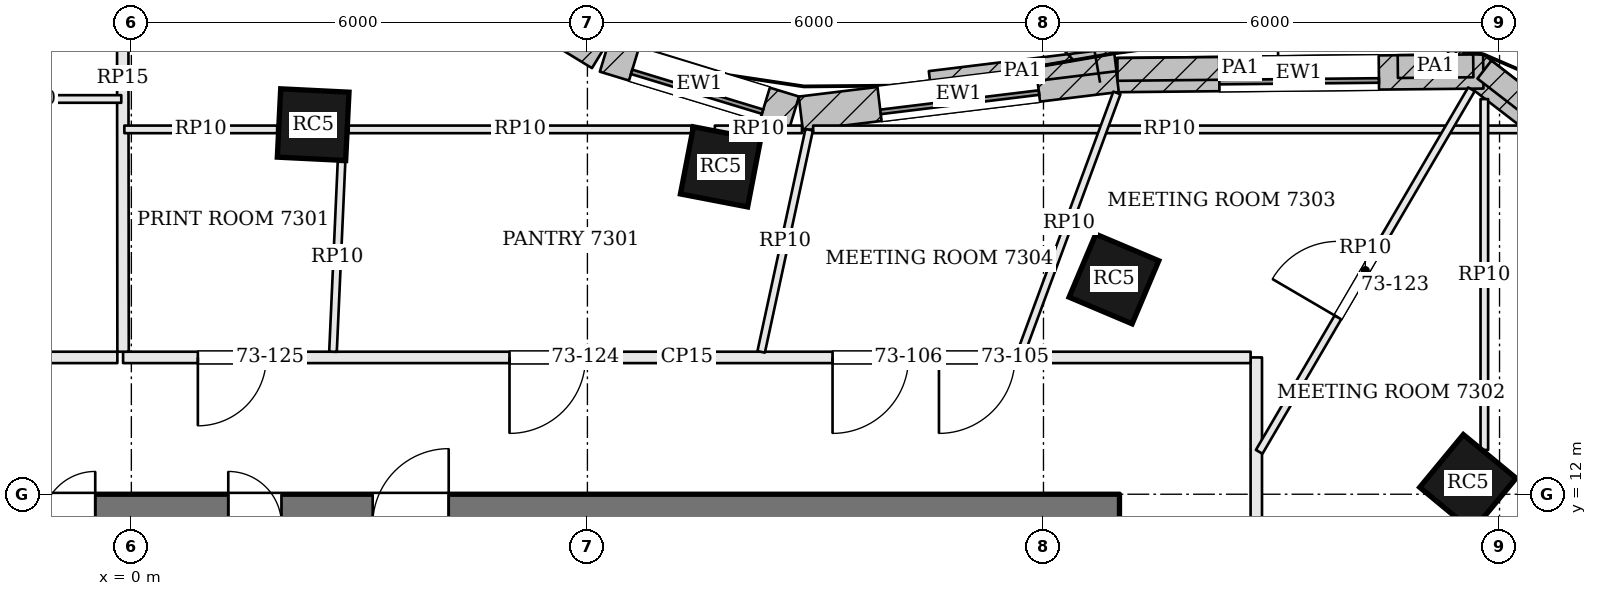
"""IFC4 building model, lengths in metres.
Left out: names, types, materials, properties, quantities, classifications, styles, units other than length and angle.
Written with IfcOpenShell. Run it as: python <this file> out.ifc"""

import sys

from ifc_helpers import new_model, si_unit, direction, frame, frame_2d, origin, origin_2d, place, context, subcontext, project, spatial, rectangle, extrude, element, fill, save


model = new_model("IFC4")
c1 = context("Model", 3, precision=1e-05, world=origin(), true_north=direction((0.0, 1.0)))
c2 = subcontext(c1, "Body", "Model", "MODEL_VIEW")
j1 = project(units=[si_unit("LENGTHUNIT", "METRE"), si_unit("PLANEANGLEUNIT", "RADIAN")], contexts=[c1])
p1 = place(None, origin())
s1 = spatial("IfcSite", under=j1, at=p1, CompositionType="ELEMENT")
p2 = place(p1, origin())
s2 = spatial("IfcBuilding", under=s1, at=p2, CompositionType="ELEMENT")
p3 = place(p2, frame((0.0, 0.0, 296.1)))
s3 = spatial("IfcBuildingStorey", under=s2, at=p3, CompositionType="ELEMENT", Elevation=296.1)
p4 = place(p3, frame((-13.0, 11.6, 0.0), z_axis=(0.0, 0.0, 1.0), x_axis=(1.0, 0.0, 0.0)))
e1 = element("IfcWall", 1, at=p4, inside=s3, PredefinedType="SHEAR", context=c2, shape_type="SweptSolid", body=[
    extrude(rectangle(XDim=26.0, YDim=0.8, at=frame_2d((13.0, 0.0))), origin(), (0.0, 0.0, 1.0), 3.9),
])
p5 = place(p4, frame((8.825, 0.0, 0.0)))
e2 = element("IfcOpeningElement", 2, at=p5, cuts=e1, PredefinedType="OPENING", context=c2, shape_type="SweptSolid", body=[
    extrude(rectangle(XDim=1.0, YDim=2.1, at=frame_2d((0.5, 1.05))), frame((0.0, 0.41, 0.0), z_axis=(0.0, -1.0, 0.0), x_axis=(1.0, 0.0, 0.0)), (0.0, 0.0, 1.0), 0.82),
])
p6 = place(p4, frame((11.825, 0.0, 0.0)))
e3 = element("IfcOpeningElement", 3, at=p6, cuts=e1, PredefinedType="OPENING", context=c2, shape_type="SweptSolid", body=[
    extrude(rectangle(XDim=0.7, YDim=2.1, at=frame_2d((0.35, 1.05))), frame((0.0, 0.41, 0.0), z_axis=(0.0, -1.0, 0.0), x_axis=(1.0, 0.0, 0.0)), (0.0, 0.0, 1.0), 0.82),
])
p7 = place(p4, frame((14.275, 0.0, 0.0)))
e4 = element("IfcOpeningElement", 4, at=p7, cuts=e1, PredefinedType="OPENING", context=c2, shape_type="SweptSolid", body=[
    extrude(rectangle(XDim=0.7, YDim=2.1, at=frame_2d((0.35, 1.05))), frame((0.0, 0.41, 0.0), z_axis=(0.0, -1.0, 0.0), x_axis=(1.0, 0.0, 0.0)), (0.0, 0.0, 1.0), 0.82),
])
p8 = place(p4, frame((16.175, 0.0, 0.0)))
e5 = element("IfcOpeningElement", 5, at=p8, cuts=e1, PredefinedType="OPENING", context=c2, shape_type="SweptSolid", body=[
    extrude(rectangle(XDim=1.0, YDim=2.1, at=frame_2d((0.5, 1.05))), frame((0.0, 0.41, 0.0), z_axis=(0.0, -1.0, 0.0), x_axis=(1.0, 0.0, 0.0)), (0.0, 0.0, 1.0), 0.82),
])
for number, where, z_axis, x_axis in (
    (6, (17.584, 12.151, 0.0), (0.0, 0.0, 1.0), (-0.771, 0.637, 0.0)),
    (7, (12.927, 14.832, 0.0), (0.0, 0.0, 1.0), (-0.921, 0.389, 0.0)),
    (8, (7.751, 16.307, 0.0), (0.0, 0.0, 1.0), (-0.982, 0.189, 0.0)),
    (9, (2.392, 16.862, 0.0), (0.0, 0.0, 1.0), (-0.999, 0.049, 0.0)),
):
    element("IfcColumn", number, at=place(p3, frame(where, z_axis=z_axis, x_axis=x_axis)), inside=s3, PredefinedType="COLUMN", context=c2, shape_type="SweptSolid", body=[
        extrude(rectangle(XDim=0.9, YDim=0.9, at=origin_2d()), origin(), (0.0, 0.0, 1.0), 3.9),
    ])
p9 = place(p3, frame((20.896, 15.104, 0.0), z_axis=(0.0, 0.0, 1.0), x_axis=(-0.791693388686, 0.610918634771, 0.0)))
e10 = element("IfcWall", 10, at=p9, inside=s3, PredefinedType="SOLIDWALL", context=c2, shape_type="SweptSolid", body=[
    extrude(rectangle(XDim=4.1, YDim=0.45, at=frame_2d((2.05, 0.0))), origin(), (0.0, 0.0, 1.0), 3.7),
])
p10 = place(p9, frame((1.0, 0.0, 0.9)))
e11 = element("IfcOpeningElement", 11, at=p10, cuts=e10, PredefinedType="OPENING", context=c2, shape_type="SweptSolid", body=[
    extrude(rectangle(XDim=2.1, YDim=2.3, at=frame_2d((1.05, 1.15))), frame((0.0, 0.235, 0.0), z_axis=(0.0, -1.0, 0.0), x_axis=(1.0, 0.0, 0.0)), (0.0, 0.0, 1.0), 0.47),
])
p11 = place(p3, frame((17.786, 17.562, 0.0), z_axis=(0.0, 0.0, 1.0), x_axis=(-0.999950280333, -0.00997180335, 0.0)))
e12 = element("IfcWall", 12, at=p11, inside=s3, PredefinedType="SOLIDWALL", context=c2, shape_type="SweptSolid", body=[
    extrude(rectangle(XDim=4.848, YDim=0.45, at=frame_2d((2.424, 0.0))), origin(), (0.0, 0.0, 1.0), 3.7),
])
p12 = place(p11, frame((1.374, 0.0, 0.9)))
e13 = element("IfcOpeningElement", 13, at=p12, cuts=e12, PredefinedType="OPENING", context=c2, shape_type="SweptSolid", body=[
    extrude(rectangle(XDim=2.1, YDim=2.3, at=frame_2d((1.05, 1.15))), frame((0.0, 0.235, 0.0), z_axis=(0.0, -1.0, 0.0), x_axis=(1.0, 0.0, 0.0)), (0.0, 0.0, 1.0), 0.47),
])
p13 = place(p3, frame((12.963, 17.515, 0.0), z_axis=(0.0, 0.0, 1.0), x_axis=(-0.992644852039, -0.121062784211, 0.0)))
e14 = element("IfcWall", 14, at=p13, inside=s3, PredefinedType="SOLIDWALL", context=c2, shape_type="SweptSolid", body=[
    extrude(rectangle(XDim=4.187, YDim=0.45, at=frame_2d((2.093, 0.0))), origin(), (0.0, 0.0, 1.0), 3.7),
])
p14 = place(p13, frame((1.043, 0.0, 0.9)))
e15 = element("IfcOpeningElement", 15, at=p14, cuts=e14, PredefinedType="OPENING", context=c2, shape_type="SweptSolid", body=[
    extrude(rectangle(XDim=2.1, YDim=2.3, at=frame_2d((1.05, 1.15))), frame((0.0, 0.235, 0.0), z_axis=(0.0, -1.0, 0.0), x_axis=(1.0, 0.0, 0.0)), (0.0, 0.0, 1.0), 0.47),
])
p15 = place(p3, frame((8.718, 17.017, 0.0), z_axis=(0.0, 0.0, 1.0), x_axis=(-0.956643192195, 0.291262429482, 0.0)))
e16 = element("IfcWall", 16, at=p15, inside=s3, PredefinedType="SOLIDWALL", context=c2, shape_type="SweptSolid", body=[
    extrude(rectangle(XDim=2.602, YDim=0.45, at=frame_2d((1.301, 0.0))), origin(), (0.0, 0.0, 1.0), 3.7),
])
p16 = place(p15, frame((0.401, 0.0, 0.9)))
e17 = element("IfcOpeningElement", 17, at=p16, cuts=e16, PredefinedType="OPENING", context=c2, shape_type="SweptSolid", body=[
    extrude(rectangle(XDim=1.8, YDim=2.3, at=frame_2d((0.9, 1.15))), frame((0.0, 0.235, 0.0), z_axis=(0.0, -1.0, 0.0), x_axis=(1.0, 0.0, 0.0)), (0.0, 0.0, 1.0), 0.47),
])
p17 = place(p3, frame((6.177, 17.798, 0.0), z_axis=(0.0, 0.0, 1.0), x_axis=(-0.852939764965, 0.52200934603, 0.0)))
e18 = element("IfcWall", 18, at=p17, inside=s3, PredefinedType="SOLIDWALL", context=c2, shape_type="SweptSolid", body=[
    extrude(rectangle(XDim=4.113, YDim=0.45, at=frame_2d((2.056, 0.0))), origin(), (0.0, 0.0, 1.0), 3.7),
])
p18 = place(p17, frame((1.006, 0.0, 0.9)))
e19 = element("IfcOpeningElement", 19, at=p18, cuts=e18, PredefinedType="OPENING", context=c2, shape_type="SweptSolid", body=[
    extrude(rectangle(XDim=2.1, YDim=2.3, at=frame_2d((1.05, 1.15))), frame((0.0, 0.235, 0.0), z_axis=(0.0, -1.0, 0.0), x_axis=(1.0, 0.0, 0.0)), (0.0, 0.0, 1.0), 0.47),
])
p19 = place(p3, frame((17.362, 17.538, 0.0), z_axis=(0.0, 0.0, 1.0), x_axis=(0.230469860183, 0.973079464148, 0.0)))
e20 = element("IfcWall", 20, at=p19, inside=s3, PredefinedType="SOLIDWALL", context=c2, shape_type="SweptSolid", body=[
    extrude(rectangle(XDim=1.75, YDim=0.2, at=frame_2d((0.875, 0.0))), origin(), (0.0, 0.0, 1.0), 3.7),
])
p20 = place(p3, frame((20.396, 15.584, 3.9), z_axis=(0.0, 0.0, 1.0), x_axis=(-0.791653544836, 0.610970265191, 0.0)))
e21 = element("IfcWall", 21, at=p20, inside=s3, PredefinedType="PARAPET", context=c2, shape_type="SweptSolid", body=[
    extrude(rectangle(XDim=3.277, YDim=0.3, at=frame_2d((1.638, 0.0))), origin(), (0.0, 0.0, 1.0), 1.1),
])
p21 = place(p3, frame((17.655, 17.636, 3.9), z_axis=(0.0, 0.0, 1.0), x_axis=(-0.999949189172, -0.010080628659, 0.0)))
e22 = element("IfcWall", 22, at=p21, inside=s3, PredefinedType="PARAPET", context=c2, shape_type="SweptSolid", body=[
    extrude(rectangle(XDim=0.993, YDim=0.3, at=frame_2d((0.497, 0.0))), origin(), (0.0, 0.0, 1.0), 1.1),
])
p22 = place(p3, frame((16.205, 17.621, 3.9), z_axis=(0.0, 0.0, 1.0), x_axis=(-0.999950267811, -0.009973058961, 0.0)))
e23 = element("IfcWall", 23, at=p22, inside=s3, PredefinedType="PARAPET", context=c2, shape_type="SweptSolid", body=[
    extrude(rectangle(XDim=3.231, YDim=0.3, at=frame_2d((1.616, 0.0))), origin(), (0.0, 0.0, 1.0), 1.1),
])
p23 = place(p3, frame((12.942, 17.714, 3.9), z_axis=(0.0, 0.0, 1.0), x_axis=(-0.992648796767, -0.121030435331, 0.0)))
e24 = element("IfcWall", 24, at=p23, inside=s3, PredefinedType="PARAPET", context=c2, shape_type="SweptSolid", body=[
    extrude(rectangle(XDim=2.451, YDim=0.3, at=frame_2d((1.226, 0.0))), origin(), (0.0, 0.0, 1.0), 1.1),
])
p24 = place(p3, frame((14.8, 0.048, 0.0), z_axis=(0.0, 0.0, 1.0), x_axis=(0.0, 1.0, 0.0)))
e25 = element("IfcWall", 25, at=p24, inside=s3, PredefinedType="PARTITIONING", context=c2, shape_type="SweptSolid", body=[
    extrude(rectangle(XDim=13.752, YDim=0.15, at=frame_2d((6.876, 0.0))), origin(), (0.0, 0.0, 1.0), 3.198),
])
p25 = place(p24, frame((1.912, 0.0, 0.0)))
e26 = element("IfcOpeningElement", 26, at=p25, cuts=e25, PredefinedType="OPENING", context=c2, shape_type="SweptSolid", body=[
    extrude(rectangle(XDim=1.8, YDim=2.1, at=frame_2d((0.9, 1.05))), frame((0.0, 0.085, 0.0), z_axis=(0.0, -1.0, 0.0), x_axis=(1.0, 0.0, 0.0)), (0.0, 0.0, 1.0), 0.17),
])
p26 = place(p24, frame((6.381, 0.0, 0.0)))
e27 = element("IfcOpeningElement", 27, at=p26, cuts=e25, PredefinedType="OPENING", context=c2, shape_type="SweptSolid", body=[
    extrude(rectangle(XDim=1.0, YDim=2.4, at=frame_2d((0.5, 1.2))), frame((0.0, 0.085, 0.0), z_axis=(0.0, -1.0, 0.0), x_axis=(1.0, 0.0, 0.0)), (0.0, 0.0, 1.0), 0.17),
])
p27 = place(p24, frame((9.792, 0.0, 0.0)))
e28 = element("IfcOpeningElement", 28, at=p27, cuts=e25, PredefinedType="OPENING", context=c2, shape_type="SweptSolid", body=[
    extrude(rectangle(XDim=1.0, YDim=2.4, at=frame_2d((0.5, 1.2))), frame((0.0, 0.085, 0.0), z_axis=(0.0, -1.0, 0.0), x_axis=(1.0, 0.0, 0.0)), (0.0, 0.0, 1.0), 0.17),
])
p28 = place(p3, frame((14.725, 13.8, 0.0), z_axis=(0.0, 0.0, 1.0), x_axis=(-1.0, 0.0, 0.0)))
e29 = element("IfcWall", 29, at=p28, inside=s3, PredefinedType="PARTITIONING", context=c2, shape_type="SweptSolid", body=[
    extrude(rectangle(XDim=14.834, YDim=0.15, at=frame_2d((7.417, 0.0))), origin(), (0.0, 0.0, 1.0), 3.198),
])
p29 = place(p28, frame((3.1, 0.0, 0.0)))
e30 = element("IfcOpeningElement", 30, at=p29, cuts=e29, PredefinedType="OPENING", context=c2, shape_type="SweptSolid", body=[
    extrude(rectangle(XDim=1.0, YDim=2.4, at=frame_2d((0.5, 1.2))), frame((0.0, 0.085, 0.0), z_axis=(0.0, -1.0, 0.0), x_axis=(1.0, 0.0, 0.0)), (0.0, 0.0, 1.0), 0.17),
])
p30 = place(p28, frame((4.5, 0.0, 0.0)))
e31 = element("IfcOpeningElement", 31, at=p30, cuts=e29, PredefinedType="OPENING", context=c2, shape_type="SweptSolid", body=[
    extrude(rectangle(XDim=1.0, YDim=2.4, at=frame_2d((0.5, 1.2))), frame((0.0, 0.085, 0.0), z_axis=(0.0, -1.0, 0.0), x_axis=(1.0, 0.0, 0.0)), (0.0, 0.0, 1.0), 0.17),
])
p31 = place(p28, frame((8.75, 0.0, 0.0)))
e32 = element("IfcOpeningElement", 32, at=p31, cuts=e29, PredefinedType="OPENING", context=c2, shape_type="SweptSolid", body=[
    extrude(rectangle(XDim=1.0, YDim=2.1, at=frame_2d((0.5, 1.05))), frame((0.0, 0.085, 0.0), z_axis=(0.0, -1.0, 0.0), x_axis=(1.0, 0.0, 0.0)), (0.0, 0.0, 1.0), 0.17),
])
p32 = place(p28, frame((12.95, 0.0, 0.0)))
e33 = element("IfcOpeningElement", 33, at=p32, cuts=e29, PredefinedType="OPENING", context=c2, shape_type="SweptSolid", body=[
    extrude(rectangle(XDim=0.9, YDim=2.1, at=frame_2d((0.45, 1.05))), frame((0.0, 0.085, 0.0), z_axis=(0.0, -1.0, 0.0), x_axis=(1.0, 0.0, 0.0)), (0.0, 0.0, 1.0), 0.17),
])
p33 = place(p3, frame((-0.117, 21.087, 0.0), z_axis=(0.0, 0.0, 1.0), x_axis=(0.001083202939, -0.999999413336, 0.0)))
e34 = element("IfcWall", 34, at=p33, inside=s3, PredefinedType="PARTITIONING", context=c2, shape_type="SweptSolid", body=[
    extrude(rectangle(XDim=7.212, YDim=0.15, at=frame_2d((3.606, 0.0))), origin(), (0.0, 0.0, 1.0), 3.234),
])
p34 = place(p3, frame((-0.184, 13.8, 0.0), z_axis=(0.0, 0.0, 1.0), x_axis=(-1.0, 0.0, 0.0)))
e35 = element("IfcWall", 35, at=p34, inside=s3, PredefinedType="PARTITIONING", context=c2, shape_type="SweptSolid", body=[
    extrude(rectangle(XDim=14.616, YDim=0.15, at=frame_2d((7.308, 0.0))), origin(), (0.0, 0.0, 1.0), 3.198),
])
p35 = place(p34, frame((4.44, 0.0, 0.0)))
e36 = element("IfcOpeningElement", 36, at=p35, cuts=e35, PredefinedType="OPENING", context=c2, shape_type="SweptSolid", body=[
    extrude(rectangle(XDim=1.8, YDim=2.1, at=frame_2d((0.9, 1.05))), frame((0.0, 0.085, 0.0), z_axis=(0.0, -1.0, 0.0), x_axis=(1.0, 0.0, 0.0)), (0.0, 0.0, 1.0), 0.17),
])
p36 = place(p34, frame((11.35, 0.0, 0.0)))
e37 = element("IfcOpeningElement", 37, at=p36, cuts=e35, PredefinedType="OPENING", context=c2, shape_type="SweptSolid", body=[
    extrude(rectangle(XDim=1.0, YDim=2.4, at=frame_2d((0.5, 1.2))), frame((0.0, 0.085, 0.0), z_axis=(0.0, -1.0, 0.0), x_axis=(1.0, 0.0, 0.0)), (0.0, 0.0, 1.0), 0.17),
])
p37 = place(p3, frame((-0.092, 16.8, 0.0), z_axis=(0.0, 0.0, 1.0), x_axis=(1.0, 0.0, 0.0)))
e38 = element("IfcWall", 38, at=p37, inside=s3, PredefinedType="PARTITIONING", context=c2, shape_type="SweptSolid", body=[
    extrude(rectangle(XDim=2.01, YDim=0.1, at=frame_2d((1.005, 0.0))), origin(), (0.0, 0.0, 1.0), 3.184),
])
p38 = place(p3, frame((2.86, 16.8, 0.0), z_axis=(0.0, 0.0, 1.0), x_axis=(1.0, 0.0, 0.0)))
e39 = element("IfcWall", 39, at=p38, inside=s3, PredefinedType="PARTITIONING", context=c2, shape_type="SweptSolid", body=[
    extrude(rectangle(XDim=4.508, YDim=0.1, at=frame_2d((2.254, 0.0))), origin(), (0.0, 0.0, 1.0), 3.184),
])
p39 = place(p3, frame((7.677, 16.8, 0.0), z_axis=(0.0, 0.0, 1.0), x_axis=(1.0, 0.0, 0.0)))
e40 = element("IfcWall", 40, at=p39, inside=s3, PredefinedType="PARTITIONING", context=c2, shape_type="SweptSolid", body=[
    extrude(rectangle(XDim=1.146, YDim=0.1, at=frame_2d((0.573, 0.0))), origin(), (0.0, 0.0, 1.0), 3.184),
])
p40 = place(p3, frame((8.97, 16.8, 0.0), z_axis=(0.0, 0.0, 1.0), x_axis=(1.0, 0.0, 0.0)))
e41 = element("IfcWall", 41, at=p40, inside=s3, PredefinedType="PARTITIONING", context=c2, shape_type="SweptSolid", body=[
    extrude(rectangle(XDim=9.377, YDim=0.1, at=frame_2d((4.688, 0.0))), origin(), (0.0, 0.0, 1.0), 3.184),
])
p41 = place(p3, frame((17.8, 17.198, 0.0), z_axis=(0.0, 0.0, 1.0), x_axis=(0.0, -1.0, 0.0)))
e42 = element("IfcWall", 42, at=p41, inside=s3, PredefinedType="PARTITIONING", context=c2, shape_type="SweptSolid", body=[
    extrude(rectangle(XDim=4.616, YDim=0.1, at=frame_2d((2.308, 0.0))), origin(), (0.0, 0.0, 1.0), 3.184),
])
p42 = place(p3, frame((14.838, 12.558, 0.0), z_axis=(0.0, 0.0, 1.0), x_axis=(0.505293152316, 0.862947756369, 0.0)))
e43 = element("IfcWall", 43, at=p42, inside=s3, PredefinedType="PARTITIONING", context=c2, shape_type="SweptSolid", body=[
    extrude(rectangle(XDim=5.526, YDim=0.1, at=frame_2d((2.763, 0.0))), origin(), (0.0, 0.0, 1.0), 3.184),
])
p43 = place(p42, frame((2.05, 0.0, 0.0)))
e44 = element("IfcOpeningElement", 44, at=p43, cuts=e43, PredefinedType="OPENING", context=c2, shape_type="SweptSolid", body=[
    extrude(rectangle(XDim=1.0, YDim=2.4, at=frame_2d((0.5, 1.2))), frame((0.0, 0.06, 0.0), z_axis=(0.0, -1.0, 0.0), x_axis=(1.0, 0.0, 0.0)), (0.0, 0.0, 1.0), 0.12),
])
p44 = place(p3, frame((11.707, 13.87, 0.0), z_axis=(0.0, 0.0, 1.0), x_axis=(0.346436838334, 0.938073300465, 0.0)))
e45 = element("IfcWall", 45, at=p44, inside=s3, PredefinedType="PARTITIONING", context=c2, shape_type="SweptSolid", body=[
    extrude(rectangle(XDim=3.634, YDim=0.1, at=frame_2d((1.817, 0.0))), origin(), (0.0, 0.0, 1.0), 3.184),
])
p45 = place(p3, frame((8.286, 13.873, 0.0), z_axis=(0.0, 0.0, 1.0), x_axis=(0.211296941388, 0.977421916349, 0.0)))
e46 = element("IfcWall", 46, at=p45, inside=s3, PredefinedType="PARTITIONING", context=c2, shape_type="SweptSolid", body=[
    extrude(rectangle(XDim=2.989, YDim=0.1, at=frame_2d((1.495, 0.0))), origin(), (0.0, 0.0, 1.0), 3.184),
])
p46 = place(p3, frame((2.653, 13.875, 0.0), z_axis=(0.0, 0.0, 1.0), x_axis=(0.044814196706, 0.998995339215, 0.0)))
e47 = element("IfcWall", 47, at=p46, inside=s3, PredefinedType="PARTITIONING", context=c2, shape_type="SweptSolid", body=[
    extrude(rectangle(XDim=2.5, YDim=0.1, at=frame_2d((1.25, 0.0))), origin(), (0.0, 0.0, 1.0), 3.184),
])
p47 = place(p3, frame((-2.551, 17.2, 0.0), z_axis=(0.0, 0.0, 1.0), x_axis=(1.0, 0.0, 0.0)))
e48 = element("IfcWall", 48, at=p47, inside=s3, PredefinedType="PARTITIONING", context=c2, shape_type="SweptSolid", body=[
    extrude(rectangle(XDim=2.418, YDim=0.1, at=frame_2d((1.209, 0.0))), origin(), (0.0, 0.0, 1.0), 3.184),
])
p48 = place(p12, origin())
e49 = element("IfcWindow", 49, at=p48, inside=s3, PartitioningType="SINGLE_PANEL", PredefinedType="WINDOW", context=c2, shape_type="SweptSolid", body=[
    extrude(rectangle(XDim=2.1, YDim=2.3, at=frame_2d((1.05, 1.15))), frame((0.0, 0.135, 0.0), z_axis=(0.0, -1.0, 0.0), x_axis=(1.0, 0.0, 0.0)), (0.0, 0.0, 1.0), 0.06),
])
fill(e13, e49)
p49 = place(p14, origin())
e50 = element("IfcWindow", 50, at=p49, inside=s3, PartitioningType="SINGLE_PANEL", PredefinedType="WINDOW", context=c2, shape_type="SweptSolid", body=[
    extrude(rectangle(XDim=2.1, YDim=2.3, at=frame_2d((1.05, 1.15))), frame((0.0, 0.135, 0.0), z_axis=(0.0, -1.0, 0.0), x_axis=(1.0, 0.0, 0.0)), (0.0, 0.0, 1.0), 0.06),
])
fill(e15, e50)
p50 = place(p16, origin())
e51 = element("IfcWindow", 51, at=p50, inside=s3, PartitioningType="SINGLE_PANEL", PredefinedType="WINDOW", context=c2, shape_type="SweptSolid", body=[
    extrude(rectangle(XDim=1.8, YDim=2.3, at=frame_2d((0.9, 1.15))), frame((0.0, 0.135, 0.0), z_axis=(0.0, -1.0, 0.0), x_axis=(1.0, 0.0, 0.0)), (0.0, 0.0, 1.0), 0.06),
])
fill(e17, e51)
p51 = place(p29, origin())
e52 = element("IfcDoor", 52, at=p51, inside=s3, OperationType="SINGLE_SWING_RIGHT", PredefinedType="DOOR", context=c2, shape_type="SweptSolid", body=[
    extrude(rectangle(XDim=1.0, YDim=2.4, at=frame_2d((0.5, 1.2))), frame((0.0, 0.025, 0.0), z_axis=(0.0, -1.0, 0.0), x_axis=(1.0, 0.0, 0.0)), (0.0, 0.0, 1.0), 0.05),
])
fill(e30, e52)
p52 = place(p30, origin())
e53 = element("IfcDoor", 53, at=p52, inside=s3, OperationType="SINGLE_SWING_RIGHT", PredefinedType="DOOR", context=c2, shape_type="SweptSolid", body=[
    extrude(rectangle(XDim=1.0, YDim=2.4, at=frame_2d((0.5, 1.2))), frame((0.0, 0.025, 0.0), z_axis=(0.0, -1.0, 0.0), x_axis=(1.0, 0.0, 0.0)), (0.0, 0.0, 1.0), 0.05),
])
fill(e31, e53)
p53 = place(p43, origin())
e54 = element("IfcDoor", 54, at=p53, inside=s3, OperationType="SINGLE_SWING_LEFT", PredefinedType="DOOR", context=c2, shape_type="SweptSolid", body=[
    extrude(rectangle(XDim=1.0, YDim=2.4, at=frame_2d((0.5, 1.2))), frame((0.0, 0.025, 0.0), z_axis=(0.0, -1.0, 0.0), x_axis=(1.0, 0.0, 0.0)), (0.0, 0.0, 1.0), 0.05),
])
fill(e44, e54)
p54 = place(p31, origin())
e55 = element("IfcDoor", 55, at=p54, inside=s3, OperationType="SINGLE_SWING_RIGHT", PredefinedType="DOOR", context=c2, shape_type="SweptSolid", body=[
    extrude(rectangle(XDim=1.0, YDim=2.1, at=frame_2d((0.5, 1.05))), frame((0.0, 0.025, 0.0), z_axis=(0.0, -1.0, 0.0), x_axis=(1.0, 0.0, 0.0)), (0.0, 0.0, 1.0), 0.05),
])
fill(e32, e55)
p55 = place(p32, origin())
e56 = element("IfcDoor", 56, at=p55, inside=s3, OperationType="SINGLE_SWING_RIGHT", PredefinedType="DOOR", context=c2, shape_type="SweptSolid", body=[
    extrude(rectangle(XDim=0.9, YDim=2.1, at=frame_2d((0.45, 1.05))), frame((0.0, 0.025, 0.0), z_axis=(0.0, -1.0, 0.0), x_axis=(1.0, 0.0, 0.0)), (0.0, 0.0, 1.0), 0.05),
])
fill(e33, e56)
save(model, sys.argv[1])
